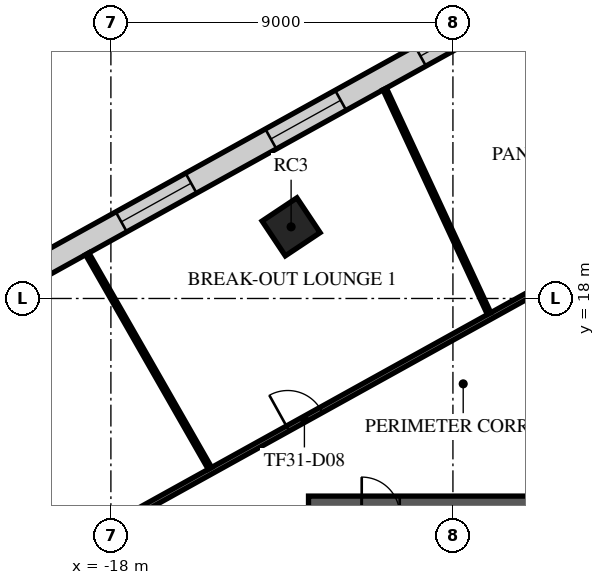
"""IFC4 building model, lengths in metres.
Left out: names, types, materials, properties, quantities, classifications, styles, units other than length and angle.
Written with IfcOpenShell. Run it as: python <this file> out.ifc"""

import sys

from ifc_helpers import new_model, si_unit, direction, frame, frame_2d, origin, origin_2d, place, context, subcontext, project, spatial, rectangle, extrude, element, fill, save


model = new_model("IFC4")
c1 = context("Model", 3, precision=1e-05, world=origin(), true_north=direction((0.0, 1.0)))
c2 = subcontext(c1, "Body", "Model", "MODEL_VIEW")
j1 = project(units=[si_unit("LENGTHUNIT", "METRE"), si_unit("PLANEANGLEUNIT", "RADIAN")], contexts=[c1])
p1 = place(None, origin())
s1 = spatial("IfcSite", under=j1, at=p1, CompositionType="ELEMENT")
p2 = place(p1, origin())
s2 = spatial("IfcBuilding", under=s1, at=p2, CompositionType="ELEMENT")
p3 = place(p2, frame((0.0, 0.0, 135.7)))
s3 = spatial("IfcBuildingStorey", under=s2, at=p3, CompositionType="ELEMENT", Elevation=135.7)
p4 = place(p3, frame((-13.258, 19.885, -0.4), z_axis=(0.0, 0.0, 1.0), x_axis=(0.832028680356, 0.55473261583, 0.0)))
e1 = element("IfcColumn", 1, at=p4, inside=s3, PredefinedType="COLUMN", context=c2, shape_type="SweptSolid", body=[
    extrude(rectangle(XDim=1.1, YDim=1.1, at=origin_2d()), origin(), (0.0, 0.0, 1.0), 4.4),
])
p5 = place(p3, frame((-12.8, 12.3, 0.0), z_axis=(0.0, 0.0, 1.0), x_axis=(1.0, 0.0, 0.0)))
e2 = element("IfcWall", 2, at=p5, inside=s3, PredefinedType="SHEAR", context=c2, shape_type="SweptSolid", body=[
    extrude(rectangle(XDim=25.6, YDim=1.0, at=frame_2d((12.8, 0.0))), origin(), (0.0, 0.0, 1.0), 3.6),
])
p6 = place(p5, frame((11.6, 0.0, 0.0)))
e3 = element("IfcOpeningElement", 3, at=p6, cuts=e2, PredefinedType="OPENING", context=c2, shape_type="SweptSolid", body=[
    extrude(rectangle(XDim=2.4, YDim=2.4, at=frame_2d((1.2, 1.2))), frame((0.0, 0.51, 0.0), z_axis=(0.0, -1.0, 0.0), x_axis=(1.0, 0.0, 0.0)), (0.0, 0.0, 1.0), 1.02),
])
p7 = place(p5, frame((22.425, 0.0, 0.0)))
e4 = element("IfcOpeningElement", 4, at=p7, cuts=e2, PredefinedType="OPENING", context=c2, shape_type="SweptSolid", body=[
    extrude(rectangle(XDim=1.2, YDim=2.1, at=frame_2d((0.6, 1.05))), frame((0.0, 0.51, 0.0), z_axis=(0.0, -1.0, 0.0), x_axis=(1.0, 0.0, 0.0)), (0.0, 0.0, 1.0), 1.02),
])
p8 = place(p5, frame((1.4, 0.0, 0.0)))
e5 = element("IfcOpeningElement", 5, at=p8, cuts=e2, PredefinedType="OPENING", context=c2, shape_type="SweptSolid", body=[
    extrude(rectangle(XDim=1.0, YDim=2.1, at=frame_2d((0.5, 1.05))), frame((0.0, 0.51, 0.0), z_axis=(0.0, -1.0, 0.0), x_axis=(1.0, 0.0, 0.0)), (0.0, 0.0, 1.0), 1.02),
])
p9 = place(p3, frame((8.775, 34.705, 0.0), z_axis=(0.0, 0.0, 1.0), x_axis=(-0.874620778241, -0.484807687922, 0.0)))
e6 = element("IfcWall", 6, at=p9, inside=s3, PredefinedType="STANDARD", context=c2, shape_type="SweptSolid", body=[
    extrude(rectangle(XDim=49.376, YDim=0.6, at=frame_2d((24.688, 0.0))), origin(), (0.0, 0.0, 1.0), 3.6),
])
p10 = place(p9, frame((1.2, 0.0, 0.9)))
e7 = element("IfcOpeningElement", 7, at=p10, cuts=e6, PredefinedType="OPENING", context=c2, shape_type="SweptSolid", body=[
    extrude(rectangle(XDim=2.1, YDim=2.1, at=frame_2d((1.05, 1.05))), frame((0.0, 0.31, 0.0), z_axis=(0.0, -1.0, 0.0), x_axis=(1.0, 0.0, 0.0)), (0.0, 0.0, 1.0), 0.62),
])
p11 = place(p9, frame((5.7, 0.0, 0.9)))
e8 = element("IfcOpeningElement", 8, at=p11, cuts=e6, PredefinedType="OPENING", context=c2, shape_type="SweptSolid", body=[
    extrude(rectangle(XDim=2.1, YDim=2.1, at=frame_2d((1.05, 1.05))), frame((0.0, 0.31, 0.0), z_axis=(0.0, -1.0, 0.0), x_axis=(1.0, 0.0, 0.0)), (0.0, 0.0, 1.0), 0.62),
])
p12 = place(p9, frame((14.7, 0.0, 0.9)))
e9 = element("IfcOpeningElement", 9, at=p12, cuts=e6, PredefinedType="OPENING", context=c2, shape_type="SweptSolid", body=[
    extrude(rectangle(XDim=2.1, YDim=2.1, at=frame_2d((1.05, 1.05))), frame((0.0, 0.31, 0.0), z_axis=(0.0, -1.0, 0.0), x_axis=(1.0, 0.0, 0.0)), (0.0, 0.0, 1.0), 0.62),
])
p13 = place(p9, frame((19.2, 0.0, 0.9)))
e10 = element("IfcOpeningElement", 10, at=p13, cuts=e6, PredefinedType="OPENING", context=c2, shape_type="SweptSolid", body=[
    extrude(rectangle(XDim=2.1, YDim=2.1, at=frame_2d((1.05, 1.05))), frame((0.0, 0.31, 0.0), z_axis=(0.0, -1.0, 0.0), x_axis=(1.0, 0.0, 0.0)), (0.0, 0.0, 1.0), 0.62),
])
p14 = place(p9, frame((23.7, 0.0, 0.9)))
e11 = element("IfcOpeningElement", 11, at=p14, cuts=e6, PredefinedType="OPENING", context=c2, shape_type="SweptSolid", body=[
    extrude(rectangle(XDim=2.1, YDim=2.1, at=frame_2d((1.05, 1.05))), frame((0.0, 0.31, 0.0), z_axis=(0.0, -1.0, 0.0), x_axis=(1.0, 0.0, 0.0)), (0.0, 0.0, 1.0), 0.62),
])
p15 = place(p9, frame((28.2, 0.0, 0.9)))
e12 = element("IfcOpeningElement", 12, at=p15, cuts=e6, PredefinedType="OPENING", context=c2, shape_type="SweptSolid", body=[
    extrude(rectangle(XDim=2.1, YDim=2.1, at=frame_2d((1.05, 1.05))), frame((0.0, 0.31, 0.0), z_axis=(0.0, -1.0, 0.0), x_axis=(1.0, 0.0, 0.0)), (0.0, 0.0, 1.0), 0.62),
])
p16 = place(p9, frame((32.7, 0.0, 0.9)))
e13 = element("IfcOpeningElement", 13, at=p16, cuts=e6, PredefinedType="OPENING", context=c2, shape_type="SweptSolid", body=[
    extrude(rectangle(XDim=2.1, YDim=2.1, at=frame_2d((1.05, 1.05))), frame((0.0, 0.31, 0.0), z_axis=(0.0, -1.0, 0.0), x_axis=(1.0, 0.0, 0.0)), (0.0, 0.0, 1.0), 0.62),
])
p17 = place(p9, frame((37.2, 0.0, 0.9)))
e14 = element("IfcOpeningElement", 14, at=p17, cuts=e6, PredefinedType="OPENING", context=c2, shape_type="SweptSolid", body=[
    extrude(rectangle(XDim=2.1, YDim=2.1, at=frame_2d((1.05, 1.05))), frame((0.0, 0.31, 0.0), z_axis=(0.0, -1.0, 0.0), x_axis=(1.0, 0.0, 0.0)), (0.0, 0.0, 1.0), 0.62),
])
p18 = place(p9, frame((41.7, 0.0, 0.9)))
e15 = element("IfcOpeningElement", 15, at=p18, cuts=e6, PredefinedType="OPENING", context=c2, shape_type="SweptSolid", body=[
    extrude(rectangle(XDim=2.1, YDim=2.1, at=frame_2d((1.05, 1.05))), frame((0.0, 0.31, 0.0), z_axis=(0.0, -1.0, 0.0), x_axis=(1.0, 0.0, 0.0)), (0.0, 0.0, 1.0), 0.62),
])
p19 = place(p9, frame((46.138, 0.0, 0.9)))
e16 = element("IfcOpeningElement", 16, at=p19, cuts=e6, PredefinedType="OPENING", context=c2, shape_type="SweptSolid", body=[
    extrude(rectangle(XDim=2.1, YDim=2.1, at=frame_2d((1.05, 1.05))), frame((0.0, 0.31, 0.0), z_axis=(0.0, -1.0, 0.0), x_axis=(1.0, 0.0, 0.0)), (0.0, 0.0, 1.0), 0.62),
])
p20 = place(p3, frame((-23.187, 9.123, 0.0), z_axis=(0.0, 0.0, 1.0), x_axis=(0.874618419846, 0.484811942578, 0.0)))
e17 = element("IfcWall", 17, at=p20, inside=s3, PredefinedType="PARTITIONING", context=c2, shape_type="SweptSolid", body=[
    extrude(rectangle(XDim=31.713, YDim=0.15, at=frame_2d((15.857, 0.0))), origin(), (0.0, 0.0, 1.0), 3.15),
])
p21 = place(p20, frame((11.252, 0.0, 0.0)))
e18 = element("IfcOpeningElement", 18, at=p21, cuts=e17, PredefinedType="OPENING", context=c2, shape_type="SweptSolid", body=[
    extrude(rectangle(XDim=1.0, YDim=2.1, at=frame_2d((0.5, 1.05))), frame((0.0, 0.085, 0.0), z_axis=(0.0, -1.0, 0.0), x_axis=(1.0, 0.0, 0.0)), (0.0, 0.0, 1.0), 0.17),
])
p22 = place(p20, frame((19.896, 0.0, 0.0)))
e19 = element("IfcOpeningElement", 19, at=p22, cuts=e17, PredefinedType="OPENING", context=c2, shape_type="SweptSolid", body=[
    extrude(rectangle(XDim=1.0, YDim=2.1, at=frame_2d((0.5, 1.05))), frame((0.0, 0.085, 0.0), z_axis=(0.0, -1.0, 0.0), x_axis=(1.0, 0.0, 0.0)), (0.0, 0.0, 1.0), 0.17),
])
p23 = place(p20, frame((29.223, 0.0, 0.0)))
e20 = element("IfcOpeningElement", 20, at=p23, cuts=e17, PredefinedType="OPENING", context=c2, shape_type="SweptSolid", body=[
    extrude(rectangle(XDim=1.0, YDim=2.1, at=frame_2d((0.5, 1.05))), frame((0.0, 0.085, 0.0), z_axis=(0.0, -1.0, 0.0), x_axis=(1.0, 0.0, 0.0)), (0.0, 0.0, 1.0), 0.17),
])
p24 = place(p3, frame((-18.622, 19.174, 0.0), z_axis=(0.0, 0.0, 1.0), x_axis=(0.496555361039, -0.8680050538, 0.0)))
e21 = element("IfcWall", 21, at=p24, inside=s3, PredefinedType="PARTITIONING", context=c2, shape_type="SweptSolid", body=[
    extrude(rectangle(XDim=6.502, YDim=0.1, at=frame_2d((3.251, 0.0))), origin(), (0.0, 0.0, 1.0), 3.15),
])
p25 = place(p3, frame((-10.795, 23.513, 0.0), z_axis=(0.0, 0.0, 1.0), x_axis=(0.42134027537, -0.906902625617, 0.0)))
e22 = element("IfcWall", 22, at=p25, inside=s3, PredefinedType="PARTITIONING", context=c2, shape_type="SweptSolid", body=[
    extrude(rectangle(XDim=6.516, YDim=0.1, at=frame_2d((3.258, 0.0))), origin(), (0.0, 0.0, 1.0), 3.15),
])
p26 = place(p13, origin())
e23 = element("IfcWindow", 23, at=p26, inside=s3, PartitioningType="SINGLE_PANEL", PredefinedType="WINDOW", context=c2, shape_type="SweptSolid", body=[
    extrude(rectangle(XDim=2.1, YDim=2.1, at=frame_2d((1.05, 1.05))), frame((0.0, 0.03, 0.0), z_axis=(0.0, -1.0, 0.0), x_axis=(1.0, 0.0, 0.0)), (0.0, 0.0, 1.0), 0.06),
])
fill(e10, e23)
p27 = place(p14, origin())
e24 = element("IfcWindow", 24, at=p27, inside=s3, PartitioningType="SINGLE_PANEL", PredefinedType="WINDOW", context=c2, shape_type="SweptSolid", body=[
    extrude(rectangle(XDim=2.1, YDim=2.1, at=frame_2d((1.05, 1.05))), frame((0.0, 0.03, 0.0), z_axis=(0.0, -1.0, 0.0), x_axis=(1.0, 0.0, 0.0)), (0.0, 0.0, 1.0), 0.06),
])
fill(e11, e24)
p28 = place(p15, origin())
e25 = element("IfcWindow", 25, at=p28, inside=s3, PartitioningType="SINGLE_PANEL", PredefinedType="WINDOW", context=c2, shape_type="SweptSolid", body=[
    extrude(rectangle(XDim=2.1, YDim=2.1, at=frame_2d((1.05, 1.05))), frame((0.0, 0.03, 0.0), z_axis=(0.0, -1.0, 0.0), x_axis=(1.0, 0.0, 0.0)), (0.0, 0.0, 1.0), 0.06),
])
fill(e12, e25)
p29 = place(p21, origin())
e26 = element("IfcDoor", 26, at=p29, inside=s3, OperationType="SINGLE_SWING_RIGHT", PredefinedType="DOOR", context=c2, shape_type="SweptSolid", body=[
    extrude(rectangle(XDim=1.0, YDim=2.1, at=frame_2d((0.5, 1.05))), frame((0.0, 0.025, 0.0), z_axis=(0.0, -1.0, 0.0), x_axis=(1.0, 0.0, 0.0)), (0.0, 0.0, 1.0), 0.05),
])
fill(e18, e26)
save(model, sys.argv[1])
